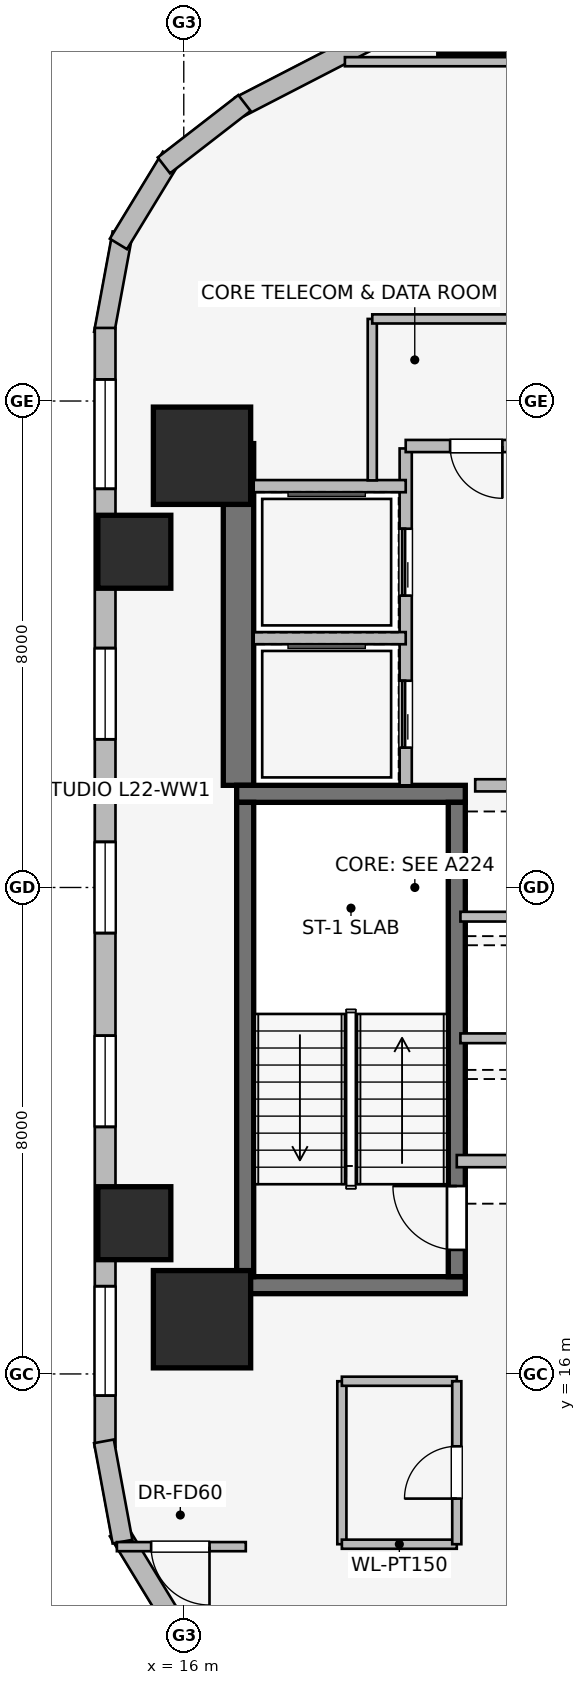
"""IFC4 building model, lengths in metres.
Left out: names, types, materials, properties, quantities, classifications, styles, units other than length and angle.
Written with IfcOpenShell. Run it as: python <this file> out.ifc"""

import sys

from ifc_helpers import new_model, si_unit, direction, frame, frame_2d, origin, origin_2d, place, context, subcontext, project, spatial, rectangle, extrude, element, fill, save


model = new_model("IFC4")
c1 = context("Model", 3, precision=1e-05, world=origin(), true_north=direction((0.0, 1.0)))
c2 = subcontext(c1, "Body", "Model", "MODEL_VIEW")
j1 = project(units=[si_unit("LENGTHUNIT", "METRE"), si_unit("PLANEANGLEUNIT", "RADIAN")], contexts=[c1])
p1 = place(None, origin())
s1 = spatial("IfcSite", under=j1, at=p1, CompositionType="ELEMENT")
p2 = place(p1, origin())
s2 = spatial("IfcBuilding", under=s1, at=p2, CompositionType="ELEMENT")
p3 = place(p2, frame((0.0, 0.0, 85.4)))
s3 = spatial("IfcBuildingStorey", under=s2, at=p3, CompositionType="ELEMENT", Elevation=85.4)
p4 = place(p3, frame((16.9, 25.68, 0.0), z_axis=(0.0, 0.0, 1.0), x_axis=(0.0, 1.0, 0.0)))
e1 = element("IfcWall", 1, at=p4, inside=s3, PredefinedType="SHEAR", context=c2, shape_type="SweptSolid", body=[
    extrude(rectangle(XDim=5.62, YDim=0.5, at=frame_2d((2.81, 0.0))), origin(), (0.0, 0.0, 1.0), 3.65),
])
for number, where, z_axis, x_axis in (
    (2, (16.87, 17.46, 0.0), (0.0, 0.0, 1.0), (1.0, 0.0, 0.0)),
    (3, (20.63, 25.54, 0.0), (0.0, 0.0, 1.0), (-1.0, 0.0, 0.0)),
):
    element("IfcWall", number, at=place(p3, frame(where, z_axis=z_axis, x_axis=x_axis)), inside=s3, PredefinedType="SHEAR", context=c2, shape_type="SweptSolid", body=[
        extrude(rectangle(XDim=3.76, YDim=0.28, at=frame_2d((1.88, 0.0))), origin(), (0.0, 0.0, 1.0), 3.65),
    ])
p5 = place(p3, frame((17.01, 25.4, 0.0), z_axis=(0.0, 0.0, 1.0), x_axis=(0.0, -1.0, 0.0)))
e4 = element("IfcWall", 4, at=p5, inside=s3, PredefinedType="SHEAR", context=c2, shape_type="SweptSolid", body=[
    extrude(rectangle(XDim=7.8, YDim=0.28, at=frame_2d((3.9, 0.0))), origin(), (0.0, 0.0, 1.0), 3.65),
])
p6 = place(p3, frame((20.49, 17.6, 0.0), z_axis=(0.0, 0.0, 1.0), x_axis=(0.0, 1.0, 0.0)))
e5 = element("IfcWall", 5, at=p6, inside=s3, PredefinedType="SHEAR", context=c2, shape_type="SweptSolid", body=[
    extrude(rectangle(XDim=7.8, YDim=0.28, at=frame_2d((3.9, 0.0))), origin(), (0.0, 0.0, 1.0), 3.65),
])
p7 = place(p6, frame((0.44, 0.0, 0.0)))
e6 = element("IfcOpeningElement", 6, at=p7, cuts=e5, PredefinedType="OPENING", context=c2, shape_type="SweptSolid", body=[
    extrude(rectangle(XDim=1.05, YDim=2.0, at=frame_2d((0.525, 1.0))), frame((0.0, 0.15, 0.0), z_axis=(0.0, -1.0, 0.0), x_axis=(1.0, 0.0, 0.0)), (0.0, 0.0, 1.0), 0.3),
])
for number, where, z_axis, x_axis in (
    (7, (16.3, 16.9, 0.0), (0.0, 0.0, 1.0), (1.0, 0.0, 0.0)),
    (8, (16.3, 31.1, 0.0), (0.0, 0.0, 1.0), (1.0, 0.0, 0.0)),
):
    element("IfcColumn", number, at=place(p3, frame(where, z_axis=z_axis, x_axis=x_axis)), inside=s3, PredefinedType="COLUMN", context=c2, shape_type="SweptSolid", body=[
        extrude(rectangle(XDim=1.6, YDim=1.6, at=origin_2d()), origin(), (0.0, 0.0, 1.0), 3.65),
    ])
for number, where, z_axis, x_axis in (
    (9, (20.793, 38.298, 0.0), (0.0, 0.0, 1.0), (1.0, 0.0, 0.0)),
    (10, (15.187, 29.521, 0.0), (0.0, 0.0, 1.0), (1.0, 0.0, 0.0)),
    (11, (15.187, 18.479, 0.0), (0.0, 0.0, 1.0), (1.0, 0.0, 0.0)),
):
    element("IfcColumn", number, at=place(p3, frame(where, z_axis=z_axis, x_axis=x_axis)), inside=s3, PredefinedType="COLUMN", context=c2, shape_type="SweptSolid", body=[
        extrude(rectangle(XDim=1.2, YDim=1.2, at=origin_2d()), origin(), (0.0, 0.0, 1.0), 3.65),
    ])
p8 = place(p3, frame((16.924, 36.841, 0.0), z_axis=(0.0, 0.0, 1.0), x_axis=(0.888634413993, 0.458616264721, 0.0)))
e12 = element("IfcWall", 12, at=p8, inside=s3, PredefinedType="STANDARD", context=c2, shape_type="SweptSolid", body=[
    extrude(rectangle(XDim=20.531, YDim=0.34, at=frame_2d((10.266, 0.0))), origin(), (0.0, 0.0, 1.0), 2.684),
])
p9 = place(p8, frame((5.111, 0.0, 0.75)))
e13 = element("IfcOpeningElement", 13, at=p9, cuts=e12, PredefinedType="OPENING", context=c2, shape_type="SweptSolid", body=[
    extrude(rectangle(XDim=1.8, YDim=1.5, at=frame_2d((0.9, 0.75))), frame((0.0, 0.18, 0.0), z_axis=(0.0, -1.0, 0.0), x_axis=(1.0, 0.0, 0.0)), (0.0, 0.0, 1.0), 0.36),
])
p10 = place(p8, frame((7.44, 0.0, 0.75)))
e14 = element("IfcOpeningElement", 14, at=p10, cuts=e12, PredefinedType="OPENING", context=c2, shape_type="SweptSolid", body=[
    extrude(rectangle(XDim=1.8, YDim=1.5, at=frame_2d((0.9, 0.75))), frame((0.0, 0.18, 0.0), z_axis=(0.0, -1.0, 0.0), x_axis=(1.0, 0.0, 0.0)), (0.0, 0.0, 1.0), 0.36),
])
p11 = place(p8, frame((10.843, 0.0, 0.75)))
e15 = element("IfcOpeningElement", 15, at=p11, cuts=e12, PredefinedType="OPENING", context=c2, shape_type="SweptSolid", body=[
    extrude(rectangle(XDim=1.5, YDim=1.5, at=frame_2d((0.75, 0.75))), frame((0.0, 0.18, 0.0), z_axis=(0.0, -1.0, 0.0), x_axis=(1.0, 0.0, 0.0)), (0.0, 0.0, 1.0), 0.36),
])
p12 = place(p8, frame((13.571, 0.0, 0.75)))
e16 = element("IfcOpeningElement", 16, at=p12, cuts=e12, PredefinedType="OPENING", context=c2, shape_type="SweptSolid", body=[
    extrude(rectangle(XDim=1.5, YDim=1.5, at=frame_2d((0.75, 0.75))), frame((0.0, 0.18, 0.0), z_axis=(0.0, -1.0, 0.0), x_axis=(1.0, 0.0, 0.0)), (0.0, 0.0, 1.0), 0.36),
])
p13 = place(p8, frame((17.476, 0.0, 0.75)))
e17 = element("IfcOpeningElement", 17, at=p13, cuts=e12, PredefinedType="OPENING", context=c2, shape_type="SweptSolid", body=[
    extrude(rectangle(XDim=1.05, YDim=1.4, at=frame_2d((0.525, 0.7))), frame((0.0, 0.18, 0.0), z_axis=(0.0, -1.0, 0.0), x_axis=(1.0, 0.0, 0.0)), (0.0, 0.0, 1.0), 0.36),
])
p14 = place(p3, frame((14.687, 33.108, 0.0), z_axis=(0.0, 0.0, 1.0), x_axis=(0.181714143354, 0.983351397063, 0.0)))
e18 = element("IfcWall", 18, at=p14, inside=s3, PredefinedType="STANDARD", context=c2, shape_type="SweptSolid", body=[
    extrude(rectangle(XDim=1.678, YDim=0.33, at=frame_2d((0.839, 0.0))), origin(), (0.0, 0.0, 1.0), 3.39),
])
p15 = place(p3, frame((14.925, 34.583, 0.0), z_axis=(0.0, 0.0, 1.0), x_axis=(0.520584129191, 0.853810379671, 0.0)))
e19 = element("IfcWall", 19, at=p15, inside=s3, PredefinedType="STANDARD", context=c2, shape_type="SweptSolid", body=[
    extrude(rectangle(XDim=1.677, YDim=0.33, at=frame_2d((0.838, 0.0))), origin(), (0.0, 0.0, 1.0), 3.39),
])
p16 = place(p3, frame((15.673, 35.875, 0.0), z_axis=(0.0, 0.0, 1.0), x_axis=(0.790691856293, 0.61221433207, 0.0)))
e20 = element("IfcWall", 20, at=p16, inside=s3, PredefinedType="STANDARD", context=c2, shape_type="SweptSolid", body=[
    extrude(rectangle(XDim=1.676, YDim=0.33, at=frame_2d((0.838, 0.0))), origin(), (0.0, 0.0, 1.0), 3.39),
])
p17 = place(p3, frame((14.707, 14.798, 0.0), z_axis=(0.0, 0.0, 1.0), x_axis=(0.0, 1.0, 0.0)))
e21 = element("IfcWall", 21, at=p17, inside=s3, PredefinedType="STANDARD", context=c2, shape_type="SweptSolid", body=[
    extrude(rectangle(XDim=18.404, YDim=0.34, at=frame_2d((9.202, 0.0))), origin(), (0.0, 0.0, 1.0), 2.684),
])
p18 = place(p17, frame((0.845, 0.0, 0.75)))
e22 = element("IfcOpeningElement", 22, at=p18, cuts=e21, PredefinedType="OPENING", context=c2, shape_type="SweptSolid", body=[
    extrude(rectangle(XDim=1.8, YDim=1.5, at=frame_2d((0.9, 0.75))), frame((0.0, 0.18, 0.0), z_axis=(0.0, -1.0, 0.0), x_axis=(1.0, 0.0, 0.0)), (0.0, 0.0, 1.0), 0.36),
])
p19 = place(p17, frame((5.265, 0.0, 0.75)))
e23 = element("IfcOpeningElement", 23, at=p19, cuts=e21, PredefinedType="OPENING", context=c2, shape_type="SweptSolid", body=[
    extrude(rectangle(XDim=1.5, YDim=1.5, at=frame_2d((0.75, 0.75))), frame((0.0, 0.18, 0.0), z_axis=(0.0, -1.0, 0.0), x_axis=(1.0, 0.0, 0.0)), (0.0, 0.0, 1.0), 0.36),
])
p20 = place(p17, frame((8.452, 0.0, 0.75)))
e24 = element("IfcOpeningElement", 24, at=p20, cuts=e21, PredefinedType="OPENING", context=c2, shape_type="SweptSolid", body=[
    extrude(rectangle(XDim=1.5, YDim=1.5, at=frame_2d((0.75, 0.75))), frame((0.0, 0.18, 0.0), z_axis=(0.0, -1.0, 0.0), x_axis=(1.0, 0.0, 0.0)), (0.0, 0.0, 1.0), 0.36),
])
p21 = place(p17, frame((11.639, 0.0, 0.75)))
e25 = element("IfcOpeningElement", 25, at=p21, cuts=e21, PredefinedType="OPENING", context=c2, shape_type="SweptSolid", body=[
    extrude(rectangle(XDim=1.5, YDim=1.5, at=frame_2d((0.75, 0.75))), frame((0.0, 0.18, 0.0), z_axis=(0.0, -1.0, 0.0), x_axis=(1.0, 0.0, 0.0)), (0.0, 0.0, 1.0), 0.36),
])
p22 = place(p17, frame((15.758, 0.0, 0.75)))
e26 = element("IfcOpeningElement", 26, at=p22, cuts=e21, PredefinedType="OPENING", context=c2, shape_type="SweptSolid", body=[
    extrude(rectangle(XDim=1.8, YDim=1.5, at=frame_2d((0.9, 0.75))), frame((0.0, 0.18, 0.0), z_axis=(0.0, -1.0, 0.0), x_axis=(1.0, 0.0, 0.0)), (0.0, 0.0, 1.0), 0.36),
])
p23 = place(p3, frame((16.998, 11.099, 0.0), z_axis=(0.0, 0.0, 1.0), x_axis=(-0.790691856293, 0.61221433207, 0.0)))
e27 = element("IfcWall", 27, at=p23, inside=s3, PredefinedType="STANDARD", context=c2, shape_type="SweptSolid", body=[
    extrude(rectangle(XDim=1.676, YDim=0.33, at=frame_2d((0.838, 0.0))), origin(), (0.0, 0.0, 1.0), 3.39),
])
p24 = place(p3, frame((15.798, 11.985, 0.0), z_axis=(0.0, 0.0, 1.0), x_axis=(-0.520584129191, 0.853810379671, 0.0)))
e28 = element("IfcWall", 28, at=p24, inside=s3, PredefinedType="STANDARD", context=c2, shape_type="SweptSolid", body=[
    extrude(rectangle(XDim=1.677, YDim=0.33, at=frame_2d((0.838, 0.0))), origin(), (0.0, 0.0, 1.0), 3.39),
])
p25 = place(p3, frame((14.992, 13.242, 0.0), z_axis=(0.0, 0.0, 1.0), x_axis=(-0.181714143354, 0.983351397063, 0.0)))
e29 = element("IfcWall", 29, at=p25, inside=s3, PredefinedType="STANDARD", context=c2, shape_type="SweptSolid", body=[
    extrude(rectangle(XDim=1.678, YDim=0.33, at=frame_2d((0.839, 0.0))), origin(), (0.0, 0.0, 1.0), 3.39),
])
p26 = place(p3, frame((19.65, 25.68, 0.0), z_axis=(0.0, 0.0, 1.0), x_axis=(0.0, 1.0, 0.0)))
e30 = element("IfcWall", 30, at=p26, inside=s3, PredefinedType="PARTITIONING", context=c2, shape_type="SweptSolid", body=[
    extrude(rectangle(XDim=5.54, YDim=0.2, at=frame_2d((2.77, 0.0))), origin(), (0.0, 0.0, 1.0), 3.39),
])
p27 = place(p26, frame((0.62, 0.0, 0.0)))
e31 = element("IfcOpeningElement", 31, at=p27, cuts=e30, PredefinedType="OPENING", context=c2, shape_type="SweptSolid", body=[
    extrude(rectangle(XDim=1.1, YDim=2.2, at=frame_2d((0.55, 1.1))), frame((0.0, 0.11, 0.0), z_axis=(0.0, -1.0, 0.0), x_axis=(1.0, 0.0, 0.0)), (0.0, 0.0, 1.0), 0.22),
])
p28 = place(p26, frame((3.12, 0.0, 0.0)))
e32 = element("IfcOpeningElement", 32, at=p28, cuts=e30, PredefinedType="OPENING", context=c2, shape_type="SweptSolid", body=[
    extrude(rectangle(XDim=1.1, YDim=2.2, at=frame_2d((0.55, 1.1))), frame((0.0, 0.11, 0.0), z_axis=(0.0, -1.0, 0.0), x_axis=(1.0, 0.0, 0.0)), (0.0, 0.0, 1.0), 0.22),
])
p29 = place(p3, frame((20.793, 25.68, 0.0), z_axis=(0.0, 0.0, 1.0), x_axis=(1.0, 0.0, 0.0)))
e33 = element("IfcWall", 33, at=p29, inside=s3, PredefinedType="PARTITIONING", context=c2, shape_type="SweptSolid", body=[
    extrude(rectangle(XDim=2.887, YDim=0.2, at=frame_2d((1.443, 0.0))), origin(), (0.0, 0.0, 1.0), 3.39),
])
p30 = place(p3, frame((21.66, 31.26, 0.0), z_axis=(0.0, 0.0, 1.0), x_axis=(-1.0, 0.0, 0.0)))
e34 = element("IfcWall", 34, at=p30, inside=s3, PredefinedType="PARTITIONING", context=c2, shape_type="SweptSolid", body=[
    extrude(rectangle(XDim=2.01, YDim=0.2, at=frame_2d((1.005, 0.0))), origin(), (0.0, 0.0, 1.0), 3.39),
])
p31 = place(p30, frame((0.42, 0.0, 0.0)))
e35 = element("IfcOpeningElement", 35, at=p31, cuts=e34, PredefinedType="OPENING", context=c2, shape_type="SweptSolid", body=[
    extrude(rectangle(XDim=0.86, YDim=2.0, at=frame_2d((0.43, 1.0))), frame((0.0, 0.11, 0.0), z_axis=(0.0, -1.0, 0.0), x_axis=(1.0, 0.0, 0.0)), (0.0, 0.0, 1.0), 0.22),
])
p32 = place(p3, frame((17.15, 28.1, 0.0), z_axis=(0.0, 0.0, 1.0), x_axis=(1.0, 0.0, 0.0)))
e36 = element("IfcWall", 36, at=p32, inside=s3, PredefinedType="PARTITIONING", context=c2, shape_type="SweptSolid", body=[
    extrude(rectangle(XDim=2.5, YDim=0.2, at=frame_2d((1.25, 0.0))), origin(), (0.0, 0.0, 1.0), 3.39),
])
p33 = place(p3, frame((19.65, 30.6, 0.0), z_axis=(0.0, 0.0, 1.0), x_axis=(-1.0, 0.0, 0.0)))
e37 = element("IfcWall", 37, at=p33, inside=s3, PredefinedType="PARTITIONING", context=c2, shape_type="SweptSolid", body=[
    extrude(rectangle(XDim=2.5, YDim=0.2, at=frame_2d((1.25, 0.0))), origin(), (0.0, 0.0, 1.0), 2.29),
])
p34 = place(p3, frame((20.49, 19.5, 0.0), z_axis=(0.0, 0.0, 1.0), x_axis=(1.0, 0.0, 0.0)))
e38 = element("IfcWall", 38, at=p34, inside=s3, PredefinedType="PARTITIONING", context=c2, shape_type="SweptSolid", body=[
    extrude(rectangle(XDim=2.41, YDim=0.2, at=frame_2d((1.205, 0.0))), origin(), (0.0, 0.0, 1.0), 2.29),
])
for number, where, z_axis, x_axis in (
    (39, (20.55, 21.52, 0.0), (0.0, 0.0, 1.0), (1.0, 0.0, 0.0)),
    (40, (20.55, 23.52, 0.0), (0.0, 0.0, 1.0), (1.0, 0.0, 0.0)),
):
    element("IfcWall", number, at=place(p3, frame(where, z_axis=z_axis, x_axis=x_axis)), inside=s3, PredefinedType="PARTITIONING", context=c2, shape_type="SweptSolid", body=[
        extrude(rectangle(XDim=2.35, YDim=0.16, at=frame_2d((1.175, 0.0))), origin(), (0.0, 0.0, 1.0), 3.39),
    ])
p35 = place(p3, frame((18.6, 15.88, 0.0), z_axis=(0.0, 0.0, 1.0), x_axis=(0.0, -1.0, 0.0)))
e41 = element("IfcWall", 41, at=p35, inside=s3, PredefinedType="PARTITIONING", context=c2, shape_type="SweptSolid", body=[
    extrude(rectangle(XDim=2.68, YDim=0.15, at=frame_2d((1.34, 0.0))), origin(), (0.0, 0.0, 1.0), 3.39),
])
for number, where, z_axis, x_axis in (
    (42, (18.6, 13.2, 0.0), (0.0, 0.0, 1.0), (1.0, 0.0, 0.0)),
    (43, (18.6, 15.88, 0.0), (0.0, 0.0, 1.0), (1.0, 0.0, 0.0)),
):
    element("IfcWall", number, at=place(p3, frame(where, z_axis=z_axis, x_axis=x_axis)), inside=s3, PredefinedType="PARTITIONING", context=c2, shape_type="SweptSolid", body=[
        extrude(rectangle(XDim=1.89, YDim=0.15, at=frame_2d((0.945, 0.0))), origin(), (0.0, 0.0, 1.0), 3.39),
    ])
p36 = place(p3, frame((20.49, 13.2, 0.0), z_axis=(0.0, 0.0, 1.0), x_axis=(0.0, 1.0, 0.0)))
e44 = element("IfcWall", 44, at=p36, inside=s3, PredefinedType="PARTITIONING", context=c2, shape_type="SweptSolid", body=[
    extrude(rectangle(XDim=2.68, YDim=0.15, at=frame_2d((1.34, 0.0))), origin(), (0.0, 0.0, 1.0), 3.39),
])
p37 = place(p36, frame((0.75, 0.0, 0.0)))
e45 = element("IfcOpeningElement", 45, at=p37, cuts=e44, PredefinedType="OPENING", context=c2, shape_type="SweptSolid", body=[
    extrude(rectangle(XDim=0.86, YDim=2.0, at=frame_2d((0.43, 1.0))), frame((0.0, 0.085, 0.0), z_axis=(0.0, -1.0, 0.0), x_axis=(1.0, 0.0, 0.0)), (0.0, 0.0, 1.0), 0.17),
])
p38 = place(p3, frame((19.1, 33.35, 0.0), z_axis=(0.0, 0.0, 1.0), x_axis=(0.0, -1.0, 0.0)))
e46 = element("IfcWall", 46, at=p38, inside=s3, PredefinedType="PARTITIONING", context=c2, shape_type="SweptSolid", body=[
    extrude(rectangle(XDim=2.655, YDim=0.15, at=frame_2d((1.328, 0.0))), origin(), (0.0, 0.0, 1.0), 3.39),
])
p39 = place(p3, frame((21.66, 33.35, 0.0), z_axis=(0.0, 0.0, 1.0), x_axis=(-1.0, 0.0, 0.0)))
e47 = element("IfcWall", 47, at=p39, inside=s3, PredefinedType="PARTITIONING", context=c2, shape_type="SweptSolid", body=[
    extrude(rectangle(XDim=2.56, YDim=0.15, at=frame_2d((1.28, 0.0))), origin(), (0.0, 0.0, 1.0), 3.39),
])
p40 = place(p3, frame((17.02, 13.16, 0.0), z_axis=(0.0, 0.0, 1.0), x_axis=(-1.0, 0.0, 0.0)))
e48 = element("IfcWall", 48, at=p40, inside=s3, PredefinedType="PARTITIONING", context=c2, shape_type="SweptSolid", body=[
    extrude(rectangle(XDim=2.12, YDim=0.15, at=frame_2d((1.06, 0.0))), origin(), (0.0, 0.0, 1.0), 3.39),
])
p41 = place(p40, frame((0.597, 0.0, 0.0)))
e49 = element("IfcOpeningElement", 49, at=p41, cuts=e48, PredefinedType="OPENING", context=c2, shape_type="SweptSolid", body=[
    extrude(rectangle(XDim=0.96, YDim=2.0, at=frame_2d((0.48, 1.0))), frame((0.0, 0.085, 0.0), z_axis=(0.0, -1.0, 0.0), x_axis=(1.0, 0.0, 0.0)), (0.0, 0.0, 1.0), 0.17),
])
p42 = place(p3, frame((25.742, 37.58, 0.0), z_axis=(0.0, 0.0, 1.0), x_axis=(-1.0, 0.0, 0.0)))
e50 = element("IfcWall", 50, at=p42, inside=s3, PredefinedType="PARTITIONING", context=c2, shape_type="SweptSolid", body=[
    extrude(rectangle(XDim=7.092, YDim=0.15, at=frame_2d((3.546, 0.0))), origin(), (0.0, 0.0, 1.0), 3.39),
])
p43 = place(p42, frame((0.883, 0.0, 0.0)))
e51 = element("IfcOpeningElement", 51, at=p43, cuts=e50, PredefinedType="OPENING", context=c2, shape_type="SweptSolid", body=[
    extrude(rectangle(XDim=0.96, YDim=2.0, at=frame_2d((0.48, 1.0))), frame((0.0, 0.085, 0.0), z_axis=(0.0, -1.0, 0.0), x_axis=(1.0, 0.0, 0.0)), (0.0, 0.0, 1.0), 0.17),
])
p44 = place(p18, origin())
e52 = element("IfcWindow", 52, at=p44, inside=s3, PartitioningType="SINGLE_PANEL", PredefinedType="WINDOW", context=c2, shape_type="SweptSolid", body=[
    extrude(rectangle(XDim=1.8, YDim=1.5, at=frame_2d((0.9, 0.75))), frame((0.0, 0.03, 0.0), z_axis=(0.0, -1.0, 0.0), x_axis=(1.0, 0.0, 0.0)), (0.0, 0.0, 1.0), 0.06),
])
fill(e22, e52)
p45 = place(p19, origin())
e53 = element("IfcWindow", 53, at=p45, inside=s3, PartitioningType="SINGLE_PANEL", PredefinedType="WINDOW", context=c2, shape_type="SweptSolid", body=[
    extrude(rectangle(XDim=1.5, YDim=1.5, at=frame_2d((0.75, 0.75))), frame((0.0, 0.03, 0.0), z_axis=(0.0, -1.0, 0.0), x_axis=(1.0, 0.0, 0.0)), (0.0, 0.0, 1.0), 0.06),
])
fill(e23, e53)
p46 = place(p20, origin())
e54 = element("IfcWindow", 54, at=p46, inside=s3, PartitioningType="SINGLE_PANEL", PredefinedType="WINDOW", context=c2, shape_type="SweptSolid", body=[
    extrude(rectangle(XDim=1.5, YDim=1.5, at=frame_2d((0.75, 0.75))), frame((0.0, 0.03, 0.0), z_axis=(0.0, -1.0, 0.0), x_axis=(1.0, 0.0, 0.0)), (0.0, 0.0, 1.0), 0.06),
])
fill(e24, e54)
p47 = place(p21, origin())
e55 = element("IfcWindow", 55, at=p47, inside=s3, PartitioningType="SINGLE_PANEL", PredefinedType="WINDOW", context=c2, shape_type="SweptSolid", body=[
    extrude(rectangle(XDim=1.5, YDim=1.5, at=frame_2d((0.75, 0.75))), frame((0.0, 0.03, 0.0), z_axis=(0.0, -1.0, 0.0), x_axis=(1.0, 0.0, 0.0)), (0.0, 0.0, 1.0), 0.06),
])
fill(e25, e55)
p48 = place(p22, origin())
e56 = element("IfcWindow", 56, at=p48, inside=s3, PartitioningType="SINGLE_PANEL", PredefinedType="WINDOW", context=c2, shape_type="SweptSolid", body=[
    extrude(rectangle(XDim=1.8, YDim=1.5, at=frame_2d((0.9, 0.75))), frame((0.0, 0.03, 0.0), z_axis=(0.0, -1.0, 0.0), x_axis=(1.0, 0.0, 0.0)), (0.0, 0.0, 1.0), 0.06),
])
fill(e26, e56)
p49 = place(p7, origin())
e57 = element("IfcDoor", 57, at=p49, inside=s3, OperationType="SINGLE_SWING_RIGHT", PredefinedType="DOOR", context=c2, shape_type="SweptSolid", body=[
    extrude(rectangle(XDim=1.05, YDim=2.0, at=frame_2d((0.525, 1.0))), frame((0.0, 0.025, 0.0), z_axis=(0.0, -1.0, 0.0), x_axis=(1.0, 0.0, 0.0)), (0.0, 0.0, 1.0), 0.05),
])
fill(e6, e57)
p50 = place(p27, origin())
e58 = element("IfcDoor", 58, at=p50, inside=s3, OperationType="SLIDING_TO_LEFT", PredefinedType="DOOR", context=c2, shape_type="SweptSolid", body=[
    extrude(rectangle(XDim=1.1, YDim=2.2, at=frame_2d((0.55, 1.1))), frame((0.0, 0.025, 0.0), z_axis=(0.0, -1.0, 0.0), x_axis=(1.0, 0.0, 0.0)), (0.0, 0.0, 1.0), 0.05),
])
fill(e31, e58)
p51 = place(p28, origin())
e59 = element("IfcDoor", 59, at=p51, inside=s3, OperationType="SLIDING_TO_LEFT", PredefinedType="DOOR", context=c2, shape_type="SweptSolid", body=[
    extrude(rectangle(XDim=1.1, YDim=2.2, at=frame_2d((0.55, 1.1))), frame((0.0, 0.025, 0.0), z_axis=(0.0, -1.0, 0.0), x_axis=(1.0, 0.0, 0.0)), (0.0, 0.0, 1.0), 0.05),
])
fill(e32, e59)
p52 = place(p31, origin())
e60 = element("IfcDoor", 60, at=p52, inside=s3, OperationType="SINGLE_SWING_LEFT", PredefinedType="DOOR", context=c2, shape_type="SweptSolid", body=[
    extrude(rectangle(XDim=0.86, YDim=2.0, at=frame_2d((0.43, 1.0))), frame((0.0, 0.025, 0.0), z_axis=(0.0, -1.0, 0.0), x_axis=(1.0, 0.0, 0.0)), (0.0, 0.0, 1.0), 0.05),
])
fill(e35, e60)
p53 = place(p37, origin())
e61 = element("IfcDoor", 61, at=p53, inside=s3, OperationType="SINGLE_SWING_LEFT", PredefinedType="DOOR", context=c2, shape_type="SweptSolid", body=[
    extrude(rectangle(XDim=0.86, YDim=2.0, at=frame_2d((0.43, 1.0))), frame((0.0, 0.025, 0.0), z_axis=(0.0, -1.0, 0.0), x_axis=(1.0, 0.0, 0.0)), (0.0, 0.0, 1.0), 0.05),
])
fill(e45, e61)
p54 = place(p41, origin())
e62 = element("IfcDoor", 62, at=p54, inside=s3, OperationType="SINGLE_SWING_LEFT", PredefinedType="DOOR", context=c2, shape_type="SweptSolid", body=[
    extrude(rectangle(XDim=0.96, YDim=2.0, at=frame_2d((0.48, 1.0))), frame((0.0, 0.025, 0.0), z_axis=(0.0, -1.0, 0.0), x_axis=(1.0, 0.0, 0.0)), (0.0, 0.0, 1.0), 0.05),
])
fill(e49, e62)
save(model, sys.argv[1])
